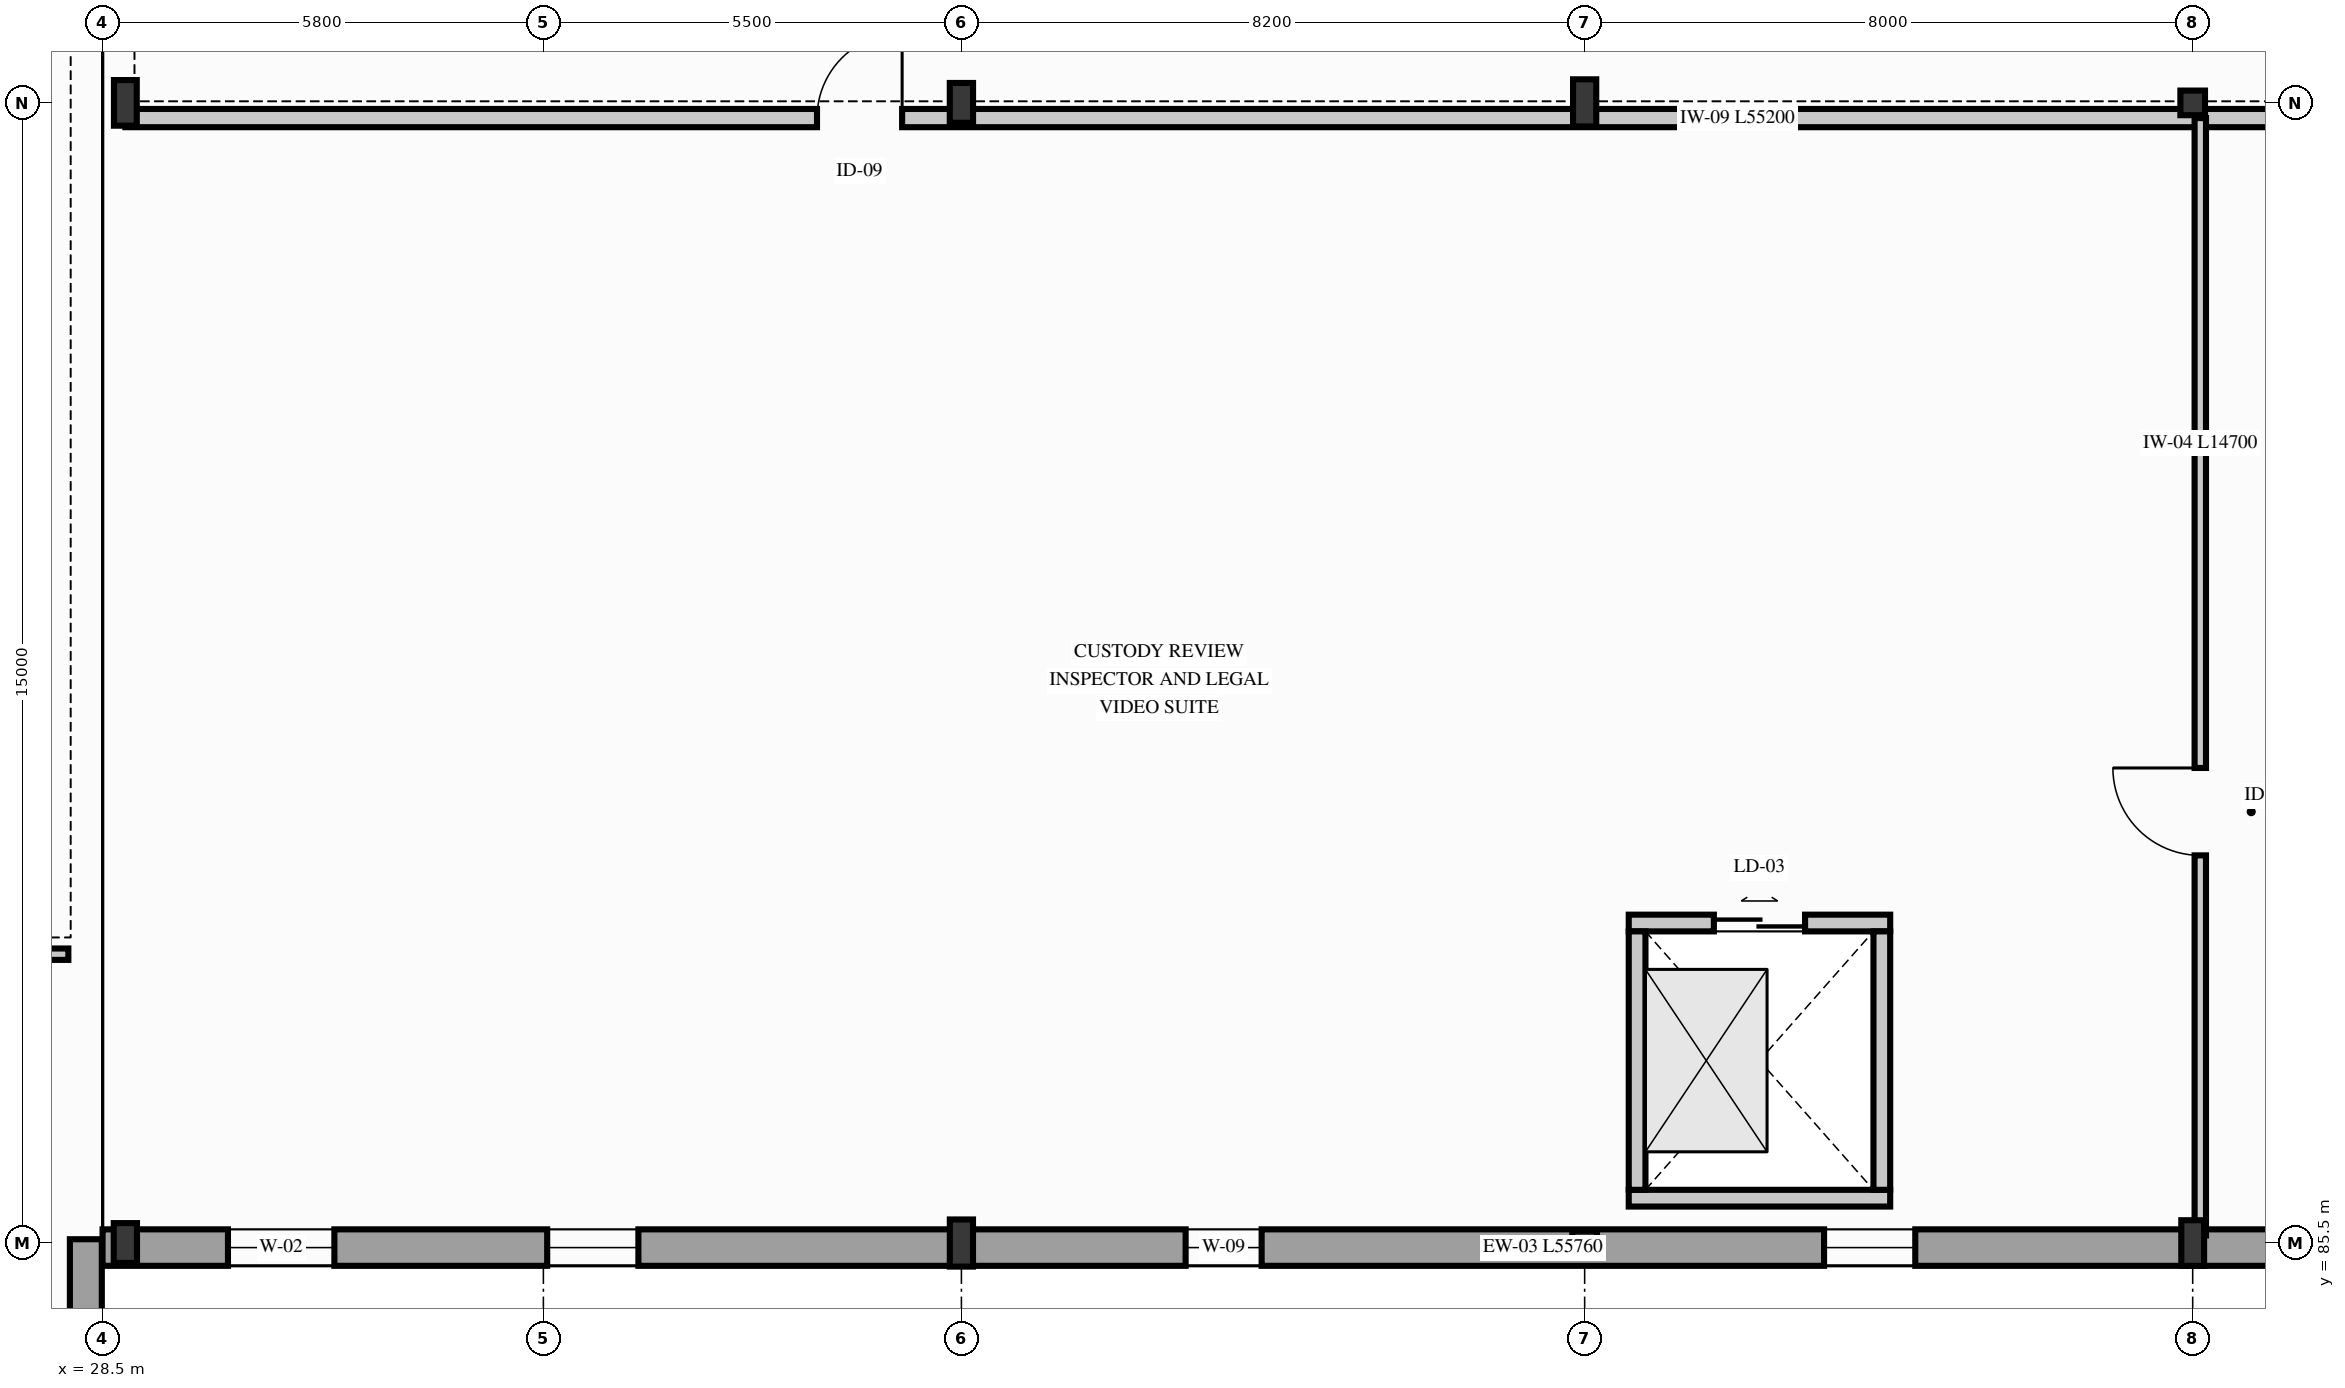
"""IFC4 building model, lengths in metres.
Left out: names, types, materials, properties, quantities, classifications, styles, units other than length and angle.
Written with IfcOpenShell. Run it as: python <this file> out.ifc"""

import sys

from ifc_helpers import new_model, si_unit, direction, frame, frame_2d, origin, origin_2d, place, context, subcontext, project, spatial, rectangle, hollow_circle, i_section, extrude, element, fill, save


model = new_model("IFC4")
c1 = context("Model", 3, precision=1e-05, world=origin(), true_north=direction((0.0, 1.0)))
c2 = subcontext(c1, "Body", "Model", "MODEL_VIEW")
j1 = project(units=[si_unit("LENGTHUNIT", "METRE"), si_unit("PLANEANGLEUNIT", "RADIAN")], contexts=[c1])
p1 = place(None, origin())
s1 = spatial("IfcSite", under=j1, at=p1, CompositionType="ELEMENT")
p2 = place(p1, origin())
s2 = spatial("IfcBuilding", under=s1, at=p2, CompositionType="ELEMENT")
p3 = place(p2, frame((0.0, 0.0, 5.1)))
s3 = spatial("IfcBuildingStorey", under=s2, at=p3, CompositionType="ELEMENT", Elevation=5.1)
p4 = place(p3, frame((28.8, 85.5, 0.0), z_axis=(0.0, 0.0, 1.0), x_axis=(1.0, 0.0, 0.0)))
e1 = element("IfcColumn", 1, at=p4, inside=s3, PredefinedType="COLUMN", context=c2, shape_type="SweptSolid", body=[
    extrude(i_section(OverallWidth=0.306, OverallDepth=0.524, WebThickness=0.021, FlangeThickness=0.04, FilletRadius=0.027, at=origin_2d()), origin(), (0.0, 0.0, 1.0), 4.2),
])
p5 = place(p3, frame((28.8, 100.5, 0.0), z_axis=(0.0, 0.0, 1.0), x_axis=(1.0, 0.0, 0.0)))
e2 = element("IfcColumn", 2, at=p5, inside=s3, PredefinedType="COLUMN", context=c2, shape_type="SweptSolid", body=[
    extrude(i_section(OverallWidth=0.3, OverallDepth=0.6, WebThickness=0.015, FlangeThickness=0.03, FilletRadius=0.027, at=origin_2d()), origin(), (0.0, 0.0, 1.0), 4.2),
])
p6 = place(p3, frame((39.8, 85.5, 0.0), z_axis=(0.0, 0.0, 1.0), x_axis=(1.0, 0.0, 0.0)))
e3 = element("IfcColumn", 3, at=p6, inside=s3, PredefinedType="COLUMN", context=c2, shape_type="SweptSolid", body=[
    extrude(i_section(OverallWidth=0.305, OverallDepth=0.62, WebThickness=0.021, FlangeThickness=0.04, FilletRadius=0.027, at=origin_2d()), origin(), (0.0, 0.0, 1.0), 4.2),
])
p7 = place(p3, frame((39.8, 100.5, 0.0), z_axis=(0.0, 0.0, 1.0), x_axis=(1.0, 0.0, 0.0)))
e4 = element("IfcColumn", 4, at=p7, inside=s3, PredefinedType="COLUMN", context=c2, shape_type="SweptSolid", body=[
    extrude(i_section(OverallWidth=0.306, OverallDepth=0.524, WebThickness=0.021, FlangeThickness=0.04, FilletRadius=0.027, at=origin_2d()), origin(), (0.0, 0.0, 1.0), 4.2),
])
p8 = place(p3, frame((48.0, 85.5, 0.0), z_axis=(0.0, 0.0, 1.0), x_axis=(1.0, 0.0, 0.0)))
e5 = element("IfcColumn", 5, at=p8, inside=s3, PredefinedType="COLUMN", context=c2, shape_type="SweptSolid", body=[
    extrude(hollow_circle(Radius=0.162, WallThickness=0.016, at=origin_2d()), origin(), (0.0, 0.0, 1.0), 4.2),
])
p9 = place(p3, frame((48.0, 100.5, 0.0), z_axis=(0.0, 0.0, 1.0), x_axis=(1.0, 0.0, 0.0)))
e6 = element("IfcColumn", 6, at=p9, inside=s3, PredefinedType="COLUMN", context=c2, shape_type="SweptSolid", body=[
    extrude(i_section(OverallWidth=0.305, OverallDepth=0.62, WebThickness=0.021, FlangeThickness=0.04, FilletRadius=0.027, at=origin_2d()), origin(), (0.0, 0.0, 1.0), 4.2),
])
p10 = place(p3, frame((56.0, 85.5, 0.0), z_axis=(0.0, 0.0, 1.0), x_axis=(1.0, 0.0, 0.0)))
e7 = element("IfcColumn", 7, at=p10, inside=s3, PredefinedType="COLUMN", context=c2, shape_type="SweptSolid", body=[
    extrude(i_section(OverallWidth=0.3, OverallDepth=0.6, WebThickness=0.015, FlangeThickness=0.03, FilletRadius=0.027, at=origin_2d()), origin(), (0.0, 0.0, 1.0), 4.2),
])
p11 = place(p3, frame((56.0, 100.5, 0.0), z_axis=(0.0, 0.0, 1.0), x_axis=(1.0, 0.0, 0.0)))
e8 = element("IfcColumn", 8, at=p11, inside=s3, PredefinedType="COLUMN", context=c2, shape_type="SweptSolid", body=[
    extrude(hollow_circle(Radius=0.162, WallThickness=0.016, at=origin_2d()), origin(), (0.0, 0.0, 1.0), 4.2),
])
p12 = place(p3, frame((28.28, 83.4, 0.0), z_axis=(0.0, 0.0, 1.0), x_axis=(0.0, 1.0, 0.0)))
e9 = element("IfcWall", 9, at=p12, inside=s3, PredefinedType="SOLIDWALL", context=c2, shape_type="SweptSolid", body=[
    extrude(rectangle(XDim=2.15, YDim=0.42, at=frame_2d((1.075, 0.0))), origin(), (0.0, 0.0, 1.0), 3.94),
])
p13 = place(p3, frame((28.5, 85.44, 0.0), z_axis=(0.0, 0.0, 1.0), x_axis=(1.0, 0.0, 0.0)))
e10 = element("IfcWall", 10, at=p13, inside=s3, PredefinedType="SOLIDWALL", context=c2, shape_type="SweptSolid", body=[
    extrude(rectangle(XDim=55.76, YDim=0.48, at=frame_2d((27.88, 0.0))), origin(), (0.0, 0.0, 1.0), 3.64),
])
p14 = place(p13, frame((54.4, 0.0, 0.0), z_axis=(0.0, 0.0, 1.0), x_axis=(-1.0, 0.0, 0.0)))
e11 = element("IfcOpeningElement", 11, at=p14, cuts=e10, PredefinedType="OPENING", context=c2, shape_type="SweptSolid", body=[
    extrude(rectangle(XDim=1.2, YDim=2.3, at=frame_2d((0.6, 1.15))), frame((0.0, 0.25, 0.0), z_axis=(0.0, -1.0, 0.0), x_axis=(1.0, 0.0, 0.0)), (0.0, 0.0, 1.0), 0.5),
])
p15 = place(p13, frame((1.65, 0.0, 0.94)))
e12 = element("IfcOpeningElement", 12, at=p15, cuts=e10, PredefinedType="OPENING", context=c2, shape_type="SweptSolid", body=[
    extrude(rectangle(XDim=1.4, YDim=2.2, at=frame_2d((0.7, 1.1))), frame((0.0, 0.25, 0.0), z_axis=(0.0, -1.0, 0.0), x_axis=(1.0, 0.0, 0.0)), (0.0, 0.0, 1.0), 0.5),
])
p16 = place(p13, frame((5.85, 0.0, 0.95)))
e13 = element("IfcOpeningElement", 13, at=p16, cuts=e10, PredefinedType="OPENING", context=c2, shape_type="SweptSolid", body=[
    extrude(rectangle(XDim=1.2, YDim=2.1, at=frame_2d((0.6, 1.05))), frame((0.0, 0.25, 0.0), z_axis=(0.0, -1.0, 0.0), x_axis=(1.0, 0.0, 0.0)), (0.0, 0.0, 1.0), 0.5),
])
p17 = place(p13, frame((14.25, 0.0, 0.95)))
e14 = element("IfcOpeningElement", 14, at=p17, cuts=e10, PredefinedType="OPENING", context=c2, shape_type="SweptSolid", body=[
    extrude(rectangle(XDim=1.0, YDim=1.6, at=frame_2d((0.5, 0.8))), frame((0.0, 0.25, 0.0), z_axis=(0.0, -1.0, 0.0), x_axis=(1.0, 0.0, 0.0)), (0.0, 0.0, 1.0), 0.5),
])
p18 = place(p13, frame((22.65, 0.0, 0.95)))
e15 = element("IfcOpeningElement", 15, at=p18, cuts=e10, PredefinedType="OPENING", context=c2, shape_type="SweptSolid", body=[
    extrude(rectangle(XDim=1.2, YDim=2.1, at=frame_2d((0.6, 1.05))), frame((0.0, 0.25, 0.0), z_axis=(0.0, -1.0, 0.0), x_axis=(1.0, 0.0, 0.0)), (0.0, 0.0, 1.0), 0.5),
])
p19 = place(p13, frame((31.05, 0.0, 0.95)))
e16 = element("IfcOpeningElement", 16, at=p19, cuts=e10, PredefinedType="OPENING", context=c2, shape_type="SweptSolid", body=[
    extrude(rectangle(XDim=1.0, YDim=1.6, at=frame_2d((0.5, 0.8))), frame((0.0, 0.25, 0.0), z_axis=(0.0, -1.0, 0.0), x_axis=(1.0, 0.0, 0.0)), (0.0, 0.0, 1.0), 0.5),
])
p20 = place(p13, frame((39.45, 0.0, 0.95)))
e17 = element("IfcOpeningElement", 17, at=p20, cuts=e10, PredefinedType="OPENING", context=c2, shape_type="SweptSolid", body=[
    extrude(rectangle(XDim=1.2, YDim=2.1, at=frame_2d((0.6, 1.05))), frame((0.0, 0.25, 0.0), z_axis=(0.0, -1.0, 0.0), x_axis=(1.0, 0.0, 0.0)), (0.0, 0.0, 1.0), 0.5),
])
p21 = place(p13, frame((47.85, 0.0, 0.95)))
e18 = element("IfcOpeningElement", 18, at=p21, cuts=e10, PredefinedType="OPENING", context=c2, shape_type="SweptSolid", body=[
    extrude(rectangle(XDim=1.0, YDim=1.6, at=frame_2d((0.5, 0.8))), frame((0.0, 0.25, 0.0), z_axis=(0.0, -1.0, 0.0), x_axis=(1.0, 0.0, 0.0)), (0.0, 0.0, 1.0), 0.5),
])
p22 = place(p3, frame((48.58, 86.09, 0.0), z_axis=(0.0, 0.0, 1.0), x_axis=(1.0, 0.0, 0.0)))
e19 = element("IfcWall", 19, at=p22, inside=s3, PredefinedType="PARTITIONING", context=c2, shape_type="SweptSolid", body=[
    extrude(rectangle(XDim=3.44, YDim=0.22, at=frame_2d((1.72, 0.0))), origin(), (0.0, 0.0, 1.0), 3.92),
])
p23 = place(p3, frame((48.58, 89.71, 0.0), z_axis=(0.0, 0.0, 1.0), x_axis=(1.0, 0.0, 0.0)))
e20 = element("IfcWall", 20, at=p23, inside=s3, PredefinedType="PARTITIONING", context=c2, shape_type="SweptSolid", body=[
    extrude(rectangle(XDim=3.44, YDim=0.22, at=frame_2d((1.72, 0.0))), origin(), (0.0, 0.0, 1.0), 3.92),
])
p24 = place(p23, frame((1.12, 0.0, 0.0)))
e21 = element("IfcOpeningElement", 21, at=p24, cuts=e20, PredefinedType="OPENING", context=c2, shape_type="SweptSolid", body=[
    extrude(rectangle(XDim=1.2, YDim=2.18, at=frame_2d((0.6, 1.09))), frame((0.0, 0.12, 0.0), z_axis=(0.0, -1.0, 0.0), x_axis=(1.0, 0.0, 0.0)), (0.0, 0.0, 1.0), 0.24),
])
for number, where, z_axis, x_axis in (
    (22, (48.69, 86.2, 0.0), (0.0, 0.0, 1.0), (0.0, 1.0, 0.0)),
    (23, (51.91, 86.2, 0.0), (0.0, 0.0, 1.0), (0.0, 1.0, 0.0)),
):
    element("IfcWall", number, at=place(p3, frame(where, z_axis=z_axis, x_axis=x_axis)), inside=s3, PredefinedType="PARTITIONING", context=c2, shape_type="SweptSolid", body=[
        extrude(rectangle(XDim=3.4, YDim=0.22, at=frame_2d((1.7, 0.0))), origin(), (0.0, 0.0, 1.0), 3.92),
    ])
p25 = place(p3, frame((16.2, 89.3, 0.0), z_axis=(0.0, 0.0, 1.0), x_axis=(1.0, 0.0, 0.0)))
e24 = element("IfcWall", 24, at=p25, inside=s3, PredefinedType="PARTITIONING", context=c2, shape_type="SweptSolid", body=[
    extrude(rectangle(XDim=11.85, YDim=0.15, at=frame_2d((5.925, 0.0))), origin(), (0.0, 0.0, 1.0), 3.92),
])
p26 = place(p25, frame((5.5, 0.0, 0.0)))
e25 = element("IfcOpeningElement", 25, at=p26, cuts=e24, PredefinedType="OPENING", context=c2, shape_type="SweptSolid", body=[
    extrude(rectangle(XDim=0.98, YDim=2.16, at=frame_2d((0.49, 1.08))), frame((0.0, 0.085, 0.0), z_axis=(0.0, -1.0, 0.0), x_axis=(1.0, 0.0, 0.0)), (0.0, 0.0, 1.0), 0.17),
])
p27 = place(p3, frame((28.8, 100.3, 0.0), z_axis=(0.0, 0.0, 1.0), x_axis=(1.0, 0.0, 0.0)))
e26 = element("IfcWall", 26, at=p27, inside=s3, PredefinedType="PARTITIONING", context=c2, shape_type="SweptSolid", body=[
    extrude(rectangle(XDim=55.2, YDim=0.24, at=frame_2d((27.6, 0.0))), origin(), (0.0, 0.0, 1.0), 3.49),
])
p28 = place(p27, frame((9.1, 0.0, 0.0)))
e27 = element("IfcOpeningElement", 27, at=p28, cuts=e26, PredefinedType="OPENING", context=c2, shape_type="SweptSolid", body=[
    extrude(rectangle(XDim=1.12, YDim=2.2, at=frame_2d((0.56, 1.1))), frame((0.0, 0.13, 0.0), z_axis=(0.0, -1.0, 0.0), x_axis=(1.0, 0.0, 0.0)), (0.0, 0.0, 1.0), 0.26),
])
p29 = place(p27, frame((38.0, 0.0, 0.0)))
e28 = element("IfcOpeningElement", 28, at=p29, cuts=e26, PredefinedType="OPENING", context=c2, shape_type="SweptSolid", body=[
    extrude(rectangle(XDim=1.12, YDim=2.2, at=frame_2d((0.56, 1.1))), frame((0.0, 0.13, 0.0), z_axis=(0.0, -1.0, 0.0), x_axis=(1.0, 0.0, 0.0)), (0.0, 0.0, 1.0), 0.26),
])
p30 = place(p3, frame((56.1, 85.6, 0.0), z_axis=(0.0, 0.0, 1.0), x_axis=(0.0, 1.0, 0.0)))
e29 = element("IfcWall", 29, at=p30, inside=s3, PredefinedType="PARTITIONING", context=c2, shape_type="SweptSolid", body=[
    extrude(rectangle(XDim=14.7, YDim=0.15, at=frame_2d((7.35, 0.0))), origin(), (0.0, 0.0, 1.0), 3.47),
])
p31 = place(p30, frame((5.0, 0.0, 0.0)))
e30 = element("IfcOpeningElement", 30, at=p31, cuts=e29, PredefinedType="OPENING", context=c2, shape_type="SweptSolid", body=[
    extrude(rectangle(XDim=1.15, YDim=2.2, at=frame_2d((0.575, 1.1))), frame((0.0, 0.085, 0.0), z_axis=(0.0, -1.0, 0.0), x_axis=(1.0, 0.0, 0.0)), (0.0, 0.0, 1.0), 0.17),
])
p32 = place(p15, origin())
e31 = element("IfcWindow", 31, at=p32, inside=s3, PartitioningType="SINGLE_PANEL", PredefinedType="WINDOW", context=c2, shape_type="SweptSolid", body=[
    extrude(rectangle(XDim=1.4, YDim=2.2, at=frame_2d((0.7, 1.1))), frame((0.0, 0.03, 0.0), z_axis=(0.0, -1.0, 0.0), x_axis=(1.0, 0.0, 0.0)), (0.0, 0.0, 1.0), 0.06),
])
fill(e12, e31)
p33 = place(p16, origin())
e32 = element("IfcWindow", 32, at=p33, inside=s3, PartitioningType="SINGLE_PANEL", PredefinedType="WINDOW", context=c2, shape_type="SweptSolid", body=[
    extrude(rectangle(XDim=1.2, YDim=2.1, at=frame_2d((0.6, 1.05))), frame((0.0, 0.03, 0.0), z_axis=(0.0, -1.0, 0.0), x_axis=(1.0, 0.0, 0.0)), (0.0, 0.0, 1.0), 0.06),
])
fill(e13, e32)
p34 = place(p17, origin())
e33 = element("IfcWindow", 33, at=p34, inside=s3, PartitioningType="SINGLE_PANEL", PredefinedType="WINDOW", context=c2, shape_type="SweptSolid", body=[
    extrude(rectangle(XDim=1.0, YDim=1.6, at=frame_2d((0.5, 0.8))), frame((0.0, 0.03, 0.0), z_axis=(0.0, -1.0, 0.0), x_axis=(1.0, 0.0, 0.0)), (0.0, 0.0, 1.0), 0.06),
])
fill(e14, e33)
p35 = place(p18, origin())
e34 = element("IfcWindow", 34, at=p35, inside=s3, PartitioningType="SINGLE_PANEL", PredefinedType="WINDOW", context=c2, shape_type="SweptSolid", body=[
    extrude(rectangle(XDim=1.2, YDim=2.1, at=frame_2d((0.6, 1.05))), frame((0.0, 0.03, 0.0), z_axis=(0.0, -1.0, 0.0), x_axis=(1.0, 0.0, 0.0)), (0.0, 0.0, 1.0), 0.06),
])
fill(e15, e34)
p36 = place(p24, origin())
e35 = element("IfcDoor", 35, at=p36, inside=s3, OperationType="DOUBLE_DOOR_SLIDING", PredefinedType="DOOR", context=c2, shape_type="SweptSolid", body=[
    extrude(rectangle(XDim=1.2, YDim=2.18, at=frame_2d((0.6, 1.09))), frame((0.0, 0.025, 0.0), z_axis=(0.0, -1.0, 0.0), x_axis=(1.0, 0.0, 0.0)), (0.0, 0.0, 1.0), 0.05),
])
fill(e21, e35)
p37 = place(p28, origin())
e36 = element("IfcDoor", 36, at=p37, inside=s3, OperationType="SINGLE_SWING_RIGHT", PredefinedType="DOOR", context=c2, shape_type="SweptSolid", body=[
    extrude(rectangle(XDim=1.12, YDim=2.2, at=frame_2d((0.56, 1.1))), frame((0.0, 0.025, 0.0), z_axis=(0.0, -1.0, 0.0), x_axis=(1.0, 0.0, 0.0)), (0.0, 0.0, 1.0), 0.05),
])
fill(e27, e36)
p38 = place(p31, origin())
e37 = element("IfcDoor", 37, at=p38, inside=s3, OperationType="SINGLE_SWING_RIGHT", PredefinedType="DOOR", context=c2, shape_type="SweptSolid", body=[
    extrude(rectangle(XDim=1.15, YDim=2.2, at=frame_2d((0.575, 1.1))), frame((0.0, 0.025, 0.0), z_axis=(0.0, -1.0, 0.0), x_axis=(1.0, 0.0, 0.0)), (0.0, 0.0, 1.0), 0.05),
])
fill(e30, e37)
save(model, sys.argv[1])
